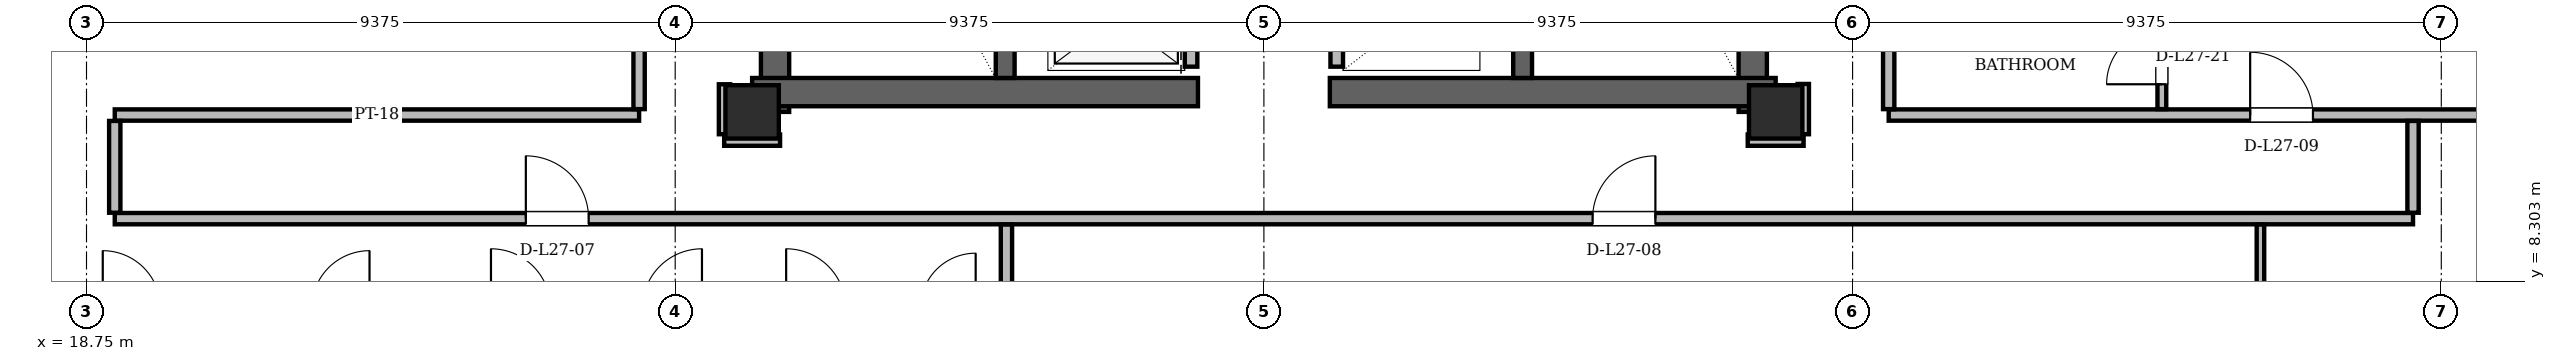
"""IFC4 building model, lengths in metres.
Left out: names, types, materials, properties, quantities, classifications, styles, units other than length and angle.
Written with IfcOpenShell. Run it as: python <this file> out.ifc"""

import sys

from ifc_helpers import new_model, si_unit, direction, frame, frame_2d, origin, origin_2d, place, context, subcontext, project, spatial, rectangle, hollow_rectangle, extrude, element, fill, save


model = new_model("IFC4")
c1 = context("Model", 3, precision=1e-05, world=origin(), true_north=direction((0.0, 1.0)))
c2 = subcontext(c1, "Body", "Model", "MODEL_VIEW")
j1 = project(units=[si_unit("LENGTHUNIT", "METRE"), si_unit("PLANEANGLEUNIT", "RADIAN")], contexts=[c1])
p1 = place(None, origin())
s1 = spatial("IfcSite", under=j1, at=p1, CompositionType="ELEMENT")
p2 = place(p1, origin())
s2 = spatial("IfcBuilding", under=s1, at=p2, CompositionType="ELEMENT")
p3 = place(p2, frame((0.0, 0.0, 104.1)))
s3 = spatial("IfcBuildingStorey", under=s2, at=p3, CompositionType="ELEMENT", Elevation=104.1)
for number, where, z_axis, x_axis in (
    (1, (29.35, 11.0, 0.0), (0.0, 0.0, 1.0), (1.0, 0.0, 0.0)),
    (2, (45.65, 11.0, 0.0), (0.0, 0.0, 1.0), (1.0, 0.0, 0.0)),
):
    element("IfcColumn", number, at=place(p3, frame(where, z_axis=z_axis, x_axis=x_axis)), inside=s3, PredefinedType="COLUMN", context=c2, shape_type="SweptSolid", body=[
        extrude(hollow_rectangle(XDim=0.85, YDim=0.85, WallThickness=0.07, at=origin_2d()), origin(), (0.0, 0.0, 1.0), 3.6),
    ])
for number, where, z_axis, x_axis in (
    (3, (29.715, 11.0, 0.0), (0.0, 0.0, 1.0), (0.0, 1.0, 0.0)),
    (4, (45.285, 11.0, 0.0), (0.0, 0.0, 1.0), (0.0, 1.0, 0.0)),
):
    element("IfcWall", number, at=place(p3, frame(where, z_axis=z_axis, x_axis=x_axis)), inside=s3, PredefinedType="SHEAR", context=c2, shape_type="SweptSolid", body=[
        extrude(rectangle(XDim=13.3, YDim=0.45, at=frame_2d((6.65, 0.0))), origin(), (0.0, 0.0, 1.0), 3.36),
    ])
for number, where, z_axis, x_axis in (
    (5, (29.35, 11.315, 0.0), (0.0, 0.0, 1.0), (1.0, 0.0, 0.0)),
    (6, (38.55, 11.315, 0.0), (0.0, 0.0, 1.0), (1.0, 0.0, 0.0)),
):
    element("IfcWall", number, at=place(p3, frame(where, z_axis=z_axis, x_axis=x_axis)), inside=s3, PredefinedType="SHEAR", context=c2, shape_type="SweptSolid", body=[
        extrude(rectangle(XDim=7.1, YDim=0.45, at=frame_2d((3.55, 0.0))), origin(), (0.0, 0.0, 1.0), 3.36),
    ])
for number, where, z_axis, x_axis in (
    (7, (33.38, 11.54, 0.0), (0.0, 0.0, 1.0), (0.0, 1.0, 0.0)),
    (8, (41.62, 11.54, 0.0), (0.0, 0.0, 1.0), (0.0, 1.0, 0.0)),
):
    element("IfcWall", number, at=place(p3, frame(where, z_axis=z_axis, x_axis=x_axis)), inside=s3, PredefinedType="SHEAR", context=c2, shape_type="SweptSolid", body=[
        extrude(rectangle(XDim=7.62, YDim=0.3, at=frame_2d((3.81, 0.0))), origin(), (0.0, 0.0, 1.0), 3.36),
    ])
p4 = place(p3, frame((14.365, 13.483, 0.0), z_axis=(0.0, 0.0, 1.0), x_axis=(0.499998829152, -0.866026079773, 0.0)))
e9 = element("IfcWall", 9, at=p4, inside=s3, PredefinedType="SOLIDWALL", context=c2, shape_type="SweptSolid", body=[
    extrude(rectangle(XDim=11.674, YDim=0.34, at=frame_2d((5.837, 0.0))), origin(), (0.0, 0.0, 1.0), 2.578),
])
p5 = place(p4, frame((8.995, 0.0, 0.85)))
e10 = element("IfcOpeningElement", 10, at=p5, cuts=e9, PredefinedType="OPENING", context=c2, shape_type="SweptSolid", body=[
    extrude(rectangle(XDim=1.2, YDim=1.48, at=frame_2d((0.6, 0.74))), frame((0.0, 0.17, 0.0), z_axis=(0.0, -1.0, 0.0), x_axis=(1.0, 0.0, 0.0)), (0.0, 0.0, 1.0), 0.34),
])
p6 = place(p3, frame((54.798, 3.373, 0.0), z_axis=(0.0, 0.0, 1.0), x_axis=(0.499998829152, 0.866026079773, 0.0)))
e11 = element("IfcWall", 11, at=p6, inside=s3, PredefinedType="SOLIDWALL", context=c2, shape_type="SweptSolid", body=[
    extrude(rectangle(XDim=11.674, YDim=0.34, at=frame_2d((5.837, 0.0))), origin(), (0.0, 0.0, 1.0), 2.578),
])
p7 = place(p3, frame((36.34, 11.72, 0.0), z_axis=(0.0, 0.0, 1.0), x_axis=(0.0, 1.0, 0.0)))
e12 = element("IfcWall", 12, at=p7, inside=s3, PredefinedType="PARTITIONING", context=c2, shape_type="SweptSolid", body=[
    extrude(rectangle(XDim=7.6, YDim=0.2, at=frame_2d((3.8, 0.0))), origin(), (0.0, 0.0, 1.0), 3.36),
])
p8 = place(p7, frame((0.255, 0.0, 0.0)))
e13 = element("IfcOpeningElement", 13, at=p8, cuts=e12, PredefinedType="OPENING", context=c2, shape_type="SweptSolid", body=[
    extrude(rectangle(XDim=1.05, YDim=2.15, at=frame_2d((0.525, 1.075))), frame((0.0, 0.1, 0.0), z_axis=(0.0, -1.0, 0.0), x_axis=(1.0, 0.0, 0.0)), (0.0, 0.0, 1.0), 0.2),
])
p9 = place(p7, frame((2.105, 0.0, 0.0)))
e14 = element("IfcOpeningElement", 14, at=p9, cuts=e12, PredefinedType="OPENING", context=c2, shape_type="SweptSolid", body=[
    extrude(rectangle(XDim=1.05, YDim=2.15, at=frame_2d((0.525, 1.075))), frame((0.0, 0.1, 0.0), z_axis=(0.0, -1.0, 0.0), x_axis=(1.0, 0.0, 0.0)), (0.0, 0.0, 1.0), 0.2),
])
p10 = place(p7, frame((3.955, 0.0, 0.0)))
e15 = element("IfcOpeningElement", 15, at=p10, cuts=e12, PredefinedType="OPENING", context=c2, shape_type="SweptSolid", body=[
    extrude(rectangle(XDim=1.05, YDim=2.15, at=frame_2d((0.525, 1.075))), frame((0.0, 0.1, 0.0), z_axis=(0.0, -1.0, 0.0), x_axis=(1.0, 0.0, 0.0)), (0.0, 0.0, 1.0), 0.2),
])
p11 = place(p3, frame((38.66, 11.72, 0.0), z_axis=(0.0, 0.0, 1.0), x_axis=(0.0, 1.0, 0.0)))
e16 = element("IfcWall", 16, at=p11, inside=s3, PredefinedType="PARTITIONING", context=c2, shape_type="SweptSolid", body=[
    extrude(rectangle(XDim=9.1, YDim=0.2, at=frame_2d((4.55, 0.0))), origin(), (0.0, 0.0, 1.0), 3.36),
])
p12 = place(p3, frame((19.2, 9.3, 0.0), z_axis=(0.0, 0.0, 1.0), x_axis=(1.0, 0.0, 0.0)))
e17 = element("IfcWall", 17, at=p12, inside=s3, PredefinedType="PARTITIONING", context=c2, shape_type="SweptSolid", body=[
    extrude(rectangle(XDim=36.6, YDim=0.18, at=frame_2d((18.3, 0.0))), origin(), (0.0, 0.0, 1.0), 2.814),
])
p13 = place(p12, frame((6.546, 0.0, 0.0)))
e18 = element("IfcOpeningElement", 18, at=p13, cuts=e17, PredefinedType="OPENING", context=c2, shape_type="SweptSolid", body=[
    extrude(rectangle(XDim=1.0, YDim=2.18, at=frame_2d((0.5, 1.09))), frame((0.0, 0.09, 0.0), z_axis=(0.0, -1.0, 0.0), x_axis=(1.0, 0.0, 0.0)), (0.0, 0.0, 1.0), 0.18),
])
p14 = place(p12, frame((23.535, 0.0, 0.0)))
e19 = element("IfcOpeningElement", 19, at=p14, cuts=e17, PredefinedType="OPENING", context=c2, shape_type="SweptSolid", body=[
    extrude(rectangle(XDim=1.0, YDim=2.18, at=frame_2d((0.5, 1.09))), frame((0.0, 0.09, 0.0), z_axis=(0.0, -1.0, 0.0), x_axis=(1.0, 0.0, 0.0)), (0.0, 0.0, 1.0), 0.18),
])
for number, where, z_axis, x_axis in (
    (20, (28.905, 10.55, 0.0), (0.0, 0.0, 1.0), (1.0, 0.0, 0.0)),
    (21, (45.205, 10.55, 0.0), (0.0, 0.0, 1.0), (1.0, 0.0, 0.0)),
):
    element("IfcWall", number, at=place(p3, frame(where, z_axis=z_axis, x_axis=x_axis)), inside=s3, PredefinedType="PARTITIONING", context=c2, shape_type="SweptSolid", body=[
        extrude(rectangle(XDim=0.89, YDim=0.18, at=frame_2d((0.445, 0.0))), origin(), (0.0, 0.0, 1.0), 3.36),
    ])
p15 = place(p3, frame((19.2, 10.95, 0.0), z_axis=(0.0, 0.0, 1.0), x_axis=(1.0, 0.0, 0.0)))
e22 = element("IfcWall", 22, at=p15, inside=s3, PredefinedType="PARTITIONING", context=c2, shape_type="SweptSolid", body=[
    extrude(rectangle(XDim=8.35, YDim=0.18, at=frame_2d((4.175, 0.0))), origin(), (0.0, 0.0, 1.0), 3.36),
])
p16 = place(p3, frame((47.45, 10.95, 0.0), z_axis=(0.0, 0.0, 1.0), x_axis=(1.0, 0.0, 0.0)))
e23 = element("IfcWall", 23, at=p16, inside=s3, PredefinedType="PARTITIONING", context=c2, shape_type="SweptSolid", body=[
    extrude(rectangle(XDim=11.521, YDim=0.18, at=frame_2d((5.761, 0.0))), origin(), (0.0, 0.0, 1.0), 3.36),
])
p17 = place(p16, frame((5.756, 0.0, 0.0)))
e24 = element("IfcOpeningElement", 24, at=p17, cuts=e23, PredefinedType="OPENING", context=c2, shape_type="SweptSolid", body=[
    extrude(rectangle(XDim=1.0, YDim=2.18, at=frame_2d((0.5, 1.09))), frame((0.0, 0.09, 0.0), z_axis=(0.0, -1.0, 0.0), x_axis=(1.0, 0.0, 0.0)), (0.0, 0.0, 1.0), 0.18),
])
p18 = place(p3, frame((19.2, 9.394, 0.0), z_axis=(0.0, 0.0, 1.0), x_axis=(0.0, 1.0, 0.0)))
e25 = element("IfcWall", 25, at=p18, inside=s3, PredefinedType="PARTITIONING", context=c2, shape_type="SweptSolid", body=[
    extrude(rectangle(XDim=1.462, YDim=0.18, at=frame_2d((0.731, 0.0))), origin(), (0.0, 0.0, 1.0), 3.36),
])
p19 = place(p3, frame((27.55, 11.044, 0.0), z_axis=(0.0, 0.0, 1.0), x_axis=(0.0, 1.0, 0.0)))
e26 = element("IfcWall", 26, at=p19, inside=s3, PredefinedType="PARTITIONING", context=c2, shape_type="SweptSolid", body=[
    extrude(rectangle(XDim=14.832, YDim=0.18, at=frame_2d((7.416, 0.0))), origin(), (0.0, 0.0, 1.0), 2.814),
])
p20 = place(p19, frame((9.795, 0.0, 0.0)))
e27 = element("IfcOpeningElement", 27, at=p20, cuts=e26, PredefinedType="OPENING", context=c2, shape_type="SweptSolid", body=[
    extrude(rectangle(XDim=1.0, YDim=2.18, at=frame_2d((0.5, 1.09))), frame((0.0, 0.09, 0.0), z_axis=(0.0, -1.0, 0.0), x_axis=(1.0, 0.0, 0.0)), (0.0, 0.0, 1.0), 0.18),
])
p21 = place(p3, frame((28.91, 10.644, 0.0), z_axis=(0.0, 0.0, 1.0), x_axis=(0.0, 1.0, 0.0)))
e28 = element("IfcWall", 28, at=p21, inside=s3, PredefinedType="PARTITIONING", context=c2, shape_type="SweptSolid", body=[
    extrude(rectangle(XDim=0.796, YDim=0.18, at=frame_2d((0.398, 0.0))), origin(), (0.0, 0.0, 1.0), 2.814),
])
p22 = place(p3, frame((33.4, 3.547, 0.0), z_axis=(0.0, 0.0, 1.0), x_axis=(0.0, 1.0, 0.0)))
e29 = element("IfcWall", 29, at=p22, inside=s3, PredefinedType="PARTITIONING", context=c2, shape_type="SweptSolid", body=[
    extrude(rectangle(XDim=5.659, YDim=0.18, at=frame_2d((2.829, 0.0))), origin(), (0.0, 0.0, 1.0), 3.36),
])
p23 = place(p3, frame((46.09, 10.644, 0.0), z_axis=(0.0, 0.0, 1.0), x_axis=(0.0, 1.0, 0.0)))
e30 = element("IfcWall", 30, at=p23, inside=s3, PredefinedType="PARTITIONING", context=c2, shape_type="SweptSolid", body=[
    extrude(rectangle(XDim=0.801, YDim=0.18, at=frame_2d((0.4, 0.0))), origin(), (0.0, 0.0, 1.0), 2.814),
])
p24 = place(p3, frame((47.45, 11.044, 0.0), z_axis=(0.0, 0.0, 1.0), x_axis=(0.0, 1.0, 0.0)))
e31 = element("IfcWall", 31, at=p24, inside=s3, PredefinedType="PARTITIONING", context=c2, shape_type="SweptSolid", body=[
    extrude(rectangle(XDim=14.832, YDim=0.18, at=frame_2d((7.416, 0.0))), origin(), (0.0, 0.0, 1.0), 2.814),
])
p25 = place(p3, frame((51.8, 11.044, 0.0), z_axis=(0.0, 0.0, 1.0), x_axis=(0.0, 1.0, 0.0)))
e32 = element("IfcWall", 32, at=p25, inside=s3, PredefinedType="PARTITIONING", context=c2, shape_type="SweptSolid", body=[
    extrude(rectangle(XDim=13.182, YDim=0.14, at=frame_2d((6.591, 0.0))), origin(), (0.0, 0.0, 1.0), 2.814),
])
p26 = place(p25, frame((0.396, 0.0, 0.0)))
e33 = element("IfcOpeningElement", 33, at=p26, cuts=e32, PredefinedType="OPENING", context=c2, shape_type="SweptSolid", body=[
    extrude(rectangle(XDim=0.88, YDim=2.08, at=frame_2d((0.44, 1.04))), frame((0.0, 0.07, 0.0), z_axis=(0.0, -1.0, 0.0), x_axis=(1.0, 0.0, 0.0)), (0.0, 0.0, 1.0), 0.14),
])
p27 = place(p25, frame((2.346, 0.0, 0.0)))
e34 = element("IfcOpeningElement", 34, at=p27, cuts=e32, PredefinedType="OPENING", context=c2, shape_type="SweptSolid", body=[
    extrude(rectangle(XDim=0.95, YDim=2.1, at=frame_2d((0.475, 1.05))), frame((0.0, 0.07, 0.0), z_axis=(0.0, -1.0, 0.0), x_axis=(1.0, 0.0, 0.0)), (0.0, 0.0, 1.0), 0.14),
])
p28 = place(p25, frame((8.116, 0.0, 0.0)))
e35 = element("IfcOpeningElement", 35, at=p28, cuts=e32, PredefinedType="OPENING", context=c2, shape_type="SweptSolid", body=[
    extrude(rectangle(XDim=0.92, YDim=2.12, at=frame_2d((0.46, 1.06))), frame((0.0, 0.07, 0.0), z_axis=(0.0, -1.0, 0.0), x_axis=(1.0, 0.0, 0.0)), (0.0, 0.0, 1.0), 0.14),
])
p29 = place(p3, frame((53.37, 3.547, 0.0), z_axis=(0.0, 0.0, 1.0), x_axis=(0.0, 1.0, 0.0)))
e36 = element("IfcWall", 36, at=p29, inside=s3, PredefinedType="PARTITIONING", context=c2, shape_type="SweptSolid", body=[
    extrude(rectangle(XDim=5.659, YDim=0.12, at=frame_2d((2.829, 0.0))), origin(), (0.0, 0.0, 1.0), 2.814),
])
p30 = place(p29, frame((2.424, 0.0, 0.0)))
e37 = element("IfcOpeningElement", 37, at=p30, cuts=e36, PredefinedType="OPENING", context=c2, shape_type="SweptSolid", body=[
    extrude(rectangle(XDim=0.88, YDim=2.08, at=frame_2d((0.44, 1.04))), frame((0.0, 0.06, 0.0), z_axis=(0.0, -1.0, 0.0), x_axis=(1.0, 0.0, 0.0)), (0.0, 0.0, 1.0), 0.12),
])
p31 = place(p3, frame((55.8, 9.394, 0.0), z_axis=(0.0, 0.0, 1.0), x_axis=(0.0, 1.0, 0.0)))
e38 = element("IfcWall", 38, at=p31, inside=s3, PredefinedType="PARTITIONING", context=c2, shape_type="SweptSolid", body=[
    extrude(rectangle(XDim=1.462, YDim=0.18, at=frame_2d((0.731, 0.0))), origin(), (0.0, 0.0, 1.0), 3.36),
])
p32 = place(p13, origin())
e39 = element("IfcDoor", 39, at=p32, inside=s3, OperationType="SINGLE_SWING_LEFT", PredefinedType="DOOR", context=c2, shape_type="SweptSolid", body=[
    extrude(rectangle(XDim=1.0, YDim=2.18, at=frame_2d((0.5, 1.09))), frame((0.0, 0.025, 0.0), z_axis=(0.0, -1.0, 0.0), x_axis=(1.0, 0.0, 0.0)), (0.0, 0.0, 1.0), 0.05),
])
fill(e18, e39)
p33 = place(p14, origin())
e40 = element("IfcDoor", 40, at=p33, inside=s3, OperationType="SINGLE_SWING_RIGHT", PredefinedType="DOOR", context=c2, shape_type="SweptSolid", body=[
    extrude(rectangle(XDim=1.0, YDim=2.18, at=frame_2d((0.5, 1.09))), frame((0.0, 0.025, 0.0), z_axis=(0.0, -1.0, 0.0), x_axis=(1.0, 0.0, 0.0)), (0.0, 0.0, 1.0), 0.05),
])
fill(e19, e40)
p34 = place(p17, origin())
e41 = element("IfcDoor", 41, at=p34, inside=s3, OperationType="SINGLE_SWING_LEFT", PredefinedType="DOOR", context=c2, shape_type="SweptSolid", body=[
    extrude(rectangle(XDim=1.0, YDim=2.18, at=frame_2d((0.5, 1.09))), frame((0.0, 0.025, 0.0), z_axis=(0.0, -1.0, 0.0), x_axis=(1.0, 0.0, 0.0)), (0.0, 0.0, 1.0), 0.05),
])
fill(e24, e41)
p35 = place(p26, origin())
e42 = element("IfcDoor", 42, at=p35, inside=s3, OperationType="SINGLE_SWING_LEFT", PredefinedType="DOOR", context=c2, shape_type="SweptSolid", body=[
    extrude(rectangle(XDim=0.88, YDim=2.08, at=frame_2d((0.44, 1.04))), frame((0.0, 0.025, 0.0), z_axis=(0.0, -1.0, 0.0), x_axis=(1.0, 0.0, 0.0)), (0.0, 0.0, 1.0), 0.05),
])
fill(e33, e42)
save(model, sys.argv[1])
